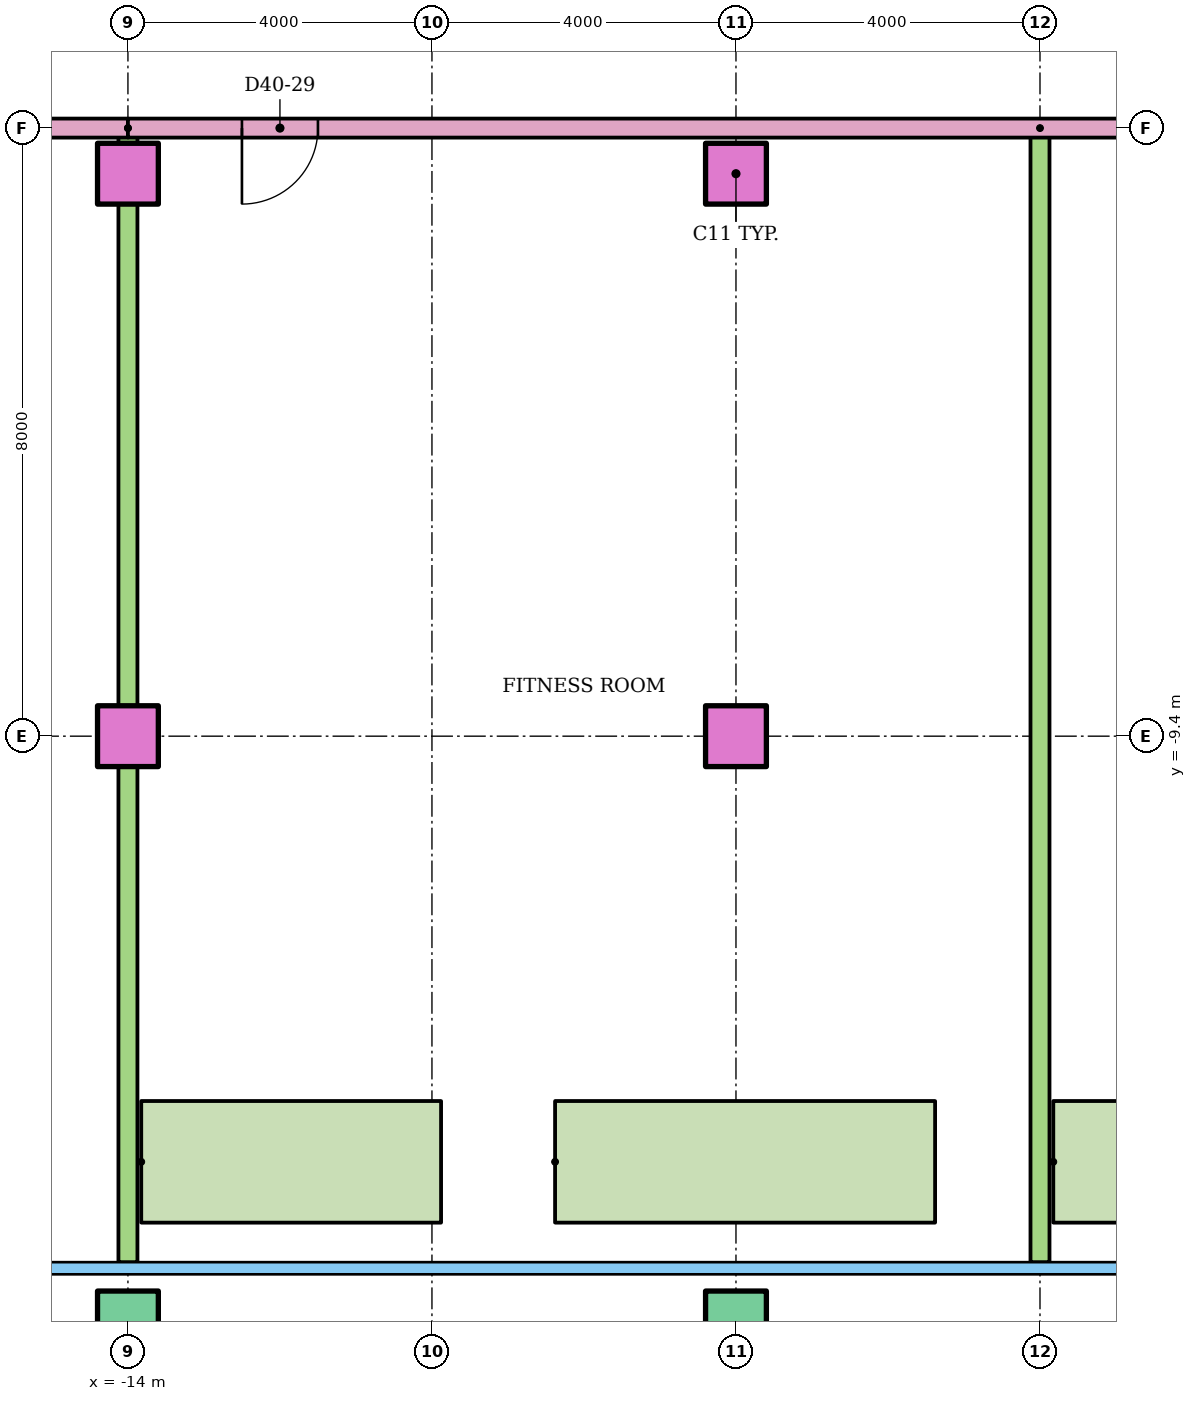
"""IFC4 building model, lengths in metres.
Left out: names, types, materials, properties, quantities, classifications, styles, units other than length and angle.
Written with IfcOpenShell. Run it as: python <this file> out.ifc"""

import sys

from ifc_helpers import new_model, si_unit, direction, frame, frame_2d, origin, origin_2d, place, context, subcontext, project, spatial, rectangle, hollow_rectangle, extrude, element, fill, save


model = new_model("IFC4")
c1 = context("Model", 3, precision=1e-05, world=origin(), true_north=direction((0.0, 1.0)))
c2 = subcontext(c1, "Body", "Model", "MODEL_VIEW")
j1 = project(units=[si_unit("LENGTHUNIT", "METRE"), si_unit("PLANEANGLEUNIT", "RADIAN")], contexts=[c1])
p1 = place(None, origin())
s1 = spatial("IfcSite", under=j1, at=p1, CompositionType="ELEMENT")
p2 = place(p1, origin())
s2 = spatial("IfcBuilding", under=s1, at=p2, CompositionType="ELEMENT")
p3 = place(p2, frame((0.0, 0.0, 151.8)))
s3 = spatial("IfcBuildingStorey", under=s2, at=p3, CompositionType="ELEMENT", Elevation=151.8)
for number, where in (
    (1, (-14.0, -17.1, 0.0)),
    (2, (-6.0, -17.1, 0.0)),
):
    element("IfcColumn", number, at=place(p3, frame(where)), inside=s3, PredefinedType="COLUMN", context=c2, shape_type="SweptSolid", body=[
        extrude(hollow_rectangle(XDim=0.8, YDim=0.8, WallThickness=0.04, at=origin_2d()), origin(), (0.0, 0.0, 1.0), 9.6),
    ])
for number, where in (
    (3, (-14.0, -9.4, 0.0)),
    (4, (-6.0, -9.4, 0.0)),
    (5, (-14.0, -2.0, 0.0)),
    (6, (-6.0, -2.0, 0.0)),
):
    element("IfcColumn", number, at=place(p3, frame(where)), inside=s3, PredefinedType="COLUMN", context=c2, shape_type="SweptSolid", body=[
        extrude(rectangle(XDim=0.8, YDim=0.8, at=origin_2d()), origin(), (0.0, 0.0, 1.0), 9.6),
    ])
p4 = place(p3, frame((-8.38, -15.0, 0.0)))
e7 = element("IfcWall", 7, at=p4, inside=s3, PredefinedType="STANDARD", context=c2, shape_type="SweptSolid", body=[
    extrude(rectangle(XDim=5.0, YDim=1.6, at=frame_2d((2.5, 0.0))), origin(), (0.0, 0.0, 1.0), 0.8),
])
p5 = place(p3, frame((-14.0, -1.4, 0.0), z_axis=(0.0, 0.0, 1.0), x_axis=(-1.0, 0.0, 0.0)))
e8 = element("IfcWall", 8, at=p5, inside=s3, PredefinedType="PARTITIONING", context=c2, shape_type="SweptSolid", body=[
    extrude(rectangle(XDim=15.0, YDim=0.25, at=frame_2d((7.5, 0.0))), origin(), (0.0, 0.0, 1.0), 8.8),
])
p6 = place(p5, frame((1.5, 0.0, 0.0)))
e9 = element("IfcOpeningElement", 9, at=p6, cuts=e8, PredefinedType="OPENING", context=c2, shape_type="SweptSolid", body=[
    extrude(rectangle(XDim=1.0, YDim=2.1, at=frame_2d((0.5, 1.05))), frame((0.0, 0.135, 0.0), z_axis=(0.0, -1.0, 0.0), x_axis=(1.0, 0.0, 0.0)), (0.0, 0.0, 1.0), 0.27),
])
p7 = place(p5, frame((8.45, 0.0, 0.0)))
e10 = element("IfcOpeningElement", 10, at=p7, cuts=e8, PredefinedType="OPENING", context=c2, shape_type="SweptSolid", body=[
    extrude(rectangle(XDim=0.9, YDim=2.1, at=frame_2d((0.45, 1.05))), frame((0.0, 0.135, 0.0), z_axis=(0.0, -1.0, 0.0), x_axis=(1.0, 0.0, 0.0)), (0.0, 0.0, 1.0), 0.27),
])
p8 = place(p5, frame((13.5, 0.0, 0.0)))
e11 = element("IfcOpeningElement", 11, at=p8, cuts=e8, PredefinedType="OPENING", context=c2, shape_type="SweptSolid", body=[
    extrude(rectangle(XDim=1.0, YDim=2.1, at=frame_2d((0.5, 1.05))), frame((0.0, 0.135, 0.0), z_axis=(0.0, -1.0, 0.0), x_axis=(1.0, 0.0, 0.0)), (0.0, 0.0, 1.0), 0.27),
])
for number, where, z_axis, x_axis in (
    (12, (-14.0, -1.4, 0.0), (0.0, 0.0, 1.0), (0.0, -1.0, 0.0)),
    (13, (-2.0, -1.4, 0.0), (0.0, 0.0, 1.0), (0.0, -1.0, 0.0)),
):
    element("IfcWall", number, at=place(p3, frame(where, z_axis=z_axis, x_axis=x_axis)), inside=s3, PredefinedType="PARTITIONING", context=c2, shape_type="SweptSolid", body=[
        extrude(rectangle(XDim=14.921, YDim=0.25, at=frame_2d((7.46, 0.0))), origin(), (0.0, 0.0, 1.0), 8.8),
    ])
p9 = place(p3, frame((14.0, -1.4, 0.0), z_axis=(0.0, 0.0, 1.0), x_axis=(-1.0, 0.0, 0.0)))
e14 = element("IfcWall", 14, at=p9, inside=s3, PredefinedType="PARTITIONING", context=c2, shape_type="SweptSolid", body=[
    extrude(rectangle(XDim=28.0, YDim=0.25, at=frame_2d((14.0, 0.0))), origin(), (0.0, 0.0, 1.0), 8.8),
])
p10 = place(p9, frame((25.5, 0.0, 0.0)))
e15 = element("IfcOpeningElement", 15, at=p10, cuts=e14, PredefinedType="OPENING", context=c2, shape_type="SweptSolid", body=[
    extrude(rectangle(XDim=1.0, YDim=2.1, at=frame_2d((0.5, 1.05))), frame((0.0, 0.135, 0.0), z_axis=(0.0, -1.0, 0.0), x_axis=(1.0, 0.0, 0.0)), (0.0, 0.0, 1.0), 0.27),
])
p11 = place(p9, frame((9.5, 0.0, 0.0)))
e16 = element("IfcOpeningElement", 16, at=p11, cuts=e14, PredefinedType="OPENING", context=c2, shape_type="SweptSolid", body=[
    extrude(rectangle(XDim=1.0, YDim=2.1, at=frame_2d((0.5, 1.05))), frame((0.0, 0.135, 0.0), z_axis=(0.0, -1.0, 0.0), x_axis=(1.0, 0.0, 0.0)), (0.0, 0.0, 1.0), 0.27),
])
p12 = place(p9, frame((5.5, 0.0, 0.0)))
e17 = element("IfcOpeningElement", 17, at=p12, cuts=e14, PredefinedType="OPENING", context=c2, shape_type="SweptSolid", body=[
    extrude(rectangle(XDim=1.0, YDim=2.1, at=frame_2d((0.5, 1.05))), frame((0.0, 0.135, 0.0), z_axis=(0.0, -1.0, 0.0), x_axis=(1.0, 0.0, 0.0)), (0.0, 0.0, 1.0), 0.27),
])
p13 = place(p3, frame((-13.825, -15.0, 0.0)))
e18 = element("IfcWall", 18, at=p13, inside=s3, PredefinedType="STANDARD", context=c2, shape_type="SweptSolid", body=[
    extrude(rectangle(XDim=3.945, YDim=1.6, at=frame_2d((1.973, 0.0))), origin(), (0.0, 0.0, 1.0), 0.8),
])
p14 = place(p3, frame((-1.825, -15.0, 0.0)))
e19 = element("IfcWall", 19, at=p14, inside=s3, PredefinedType="STANDARD", context=c2, shape_type="SweptSolid", body=[
    extrude(rectangle(XDim=4.945, YDim=1.6, at=frame_2d((2.473, 0.0))), origin(), (0.0, 0.0, 1.0), 0.8),
])
p15 = place(p10, origin())
e20 = element("IfcDoor", 20, at=p15, inside=s3, OperationType="SINGLE_SWING_RIGHT", PredefinedType="DOOR", context=c2, shape_type="SweptSolid", body=[
    extrude(rectangle(XDim=1.0, YDim=2.1, at=frame_2d((0.5, 1.05))), frame((0.0, 0.025, 0.0), z_axis=(0.0, -1.0, 0.0), x_axis=(1.0, 0.0, 0.0)), (0.0, 0.0, 1.0), 0.05),
])
fill(e15, e20)
save(model, sys.argv[1])
